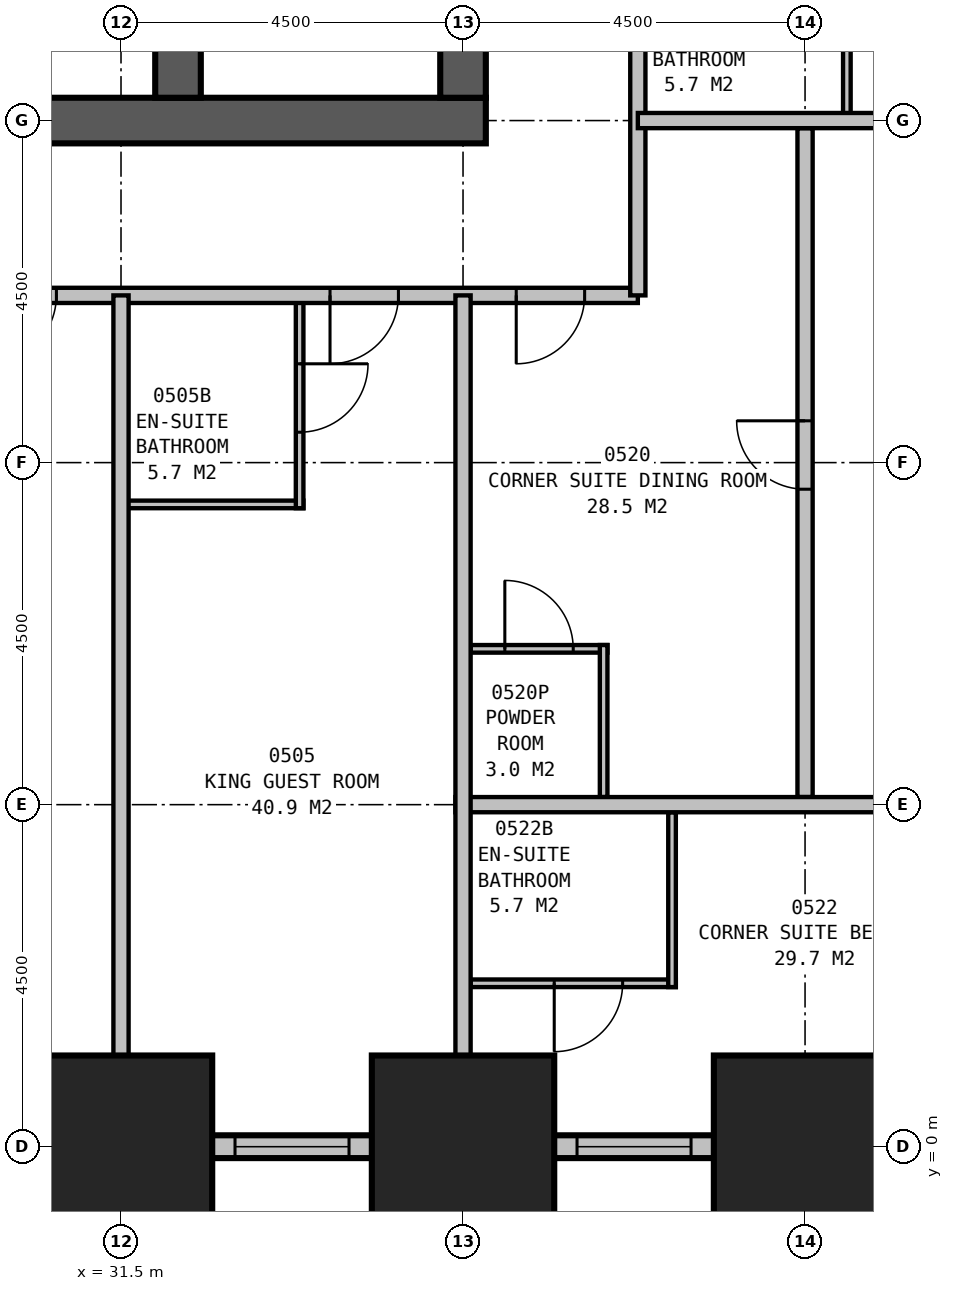
"""IFC4 building model, lengths in metres.
Left out: names, types, materials, properties, quantities, classifications, styles, units other than length and angle.
Written with IfcOpenShell. Run it as: python <this file> out.ifc"""

import sys

from ifc_helpers import new_model, si_unit, direction, frame, frame_2d, origin, origin_2d, place, context, subcontext, project, spatial, rectangle, extrude, element, fill, save


model = new_model("IFC4")
c1 = context("Model", 3, precision=1e-05, world=origin(), true_north=direction((0.0, 1.0)))
c2 = subcontext(c1, "Body", "Model", "MODEL_VIEW")
j1 = project(units=[si_unit("LENGTHUNIT", "METRE"), si_unit("PLANEANGLEUNIT", "RADIAN")], contexts=[c1])
p1 = place(None, origin())
s1 = spatial("IfcSite", under=j1, at=p1, CompositionType="ELEMENT")
p2 = place(p1, origin())
s2 = spatial("IfcBuilding", under=s1, at=p2, CompositionType="ELEMENT")
p3 = place(p2, frame((0.0, 0.0, 29.7)))
s3 = spatial("IfcBuildingStorey", under=s2, at=p3, CompositionType="ELEMENT", Elevation=29.7)
for number, where, z_axis, x_axis in (
    (1, (31.5, 0.0, 0.0), (0.0, 0.0, 1.0), (1.0, 0.0, 0.0)),
    (2, (36.0, 0.0, 0.0), (0.0, 0.0, 1.0), (1.0, 0.0, 0.0)),
    (3, (40.5, 0.0, 0.0), (0.0, 0.0, 1.0), (1.0, 0.0, 0.0)),
):
    element("IfcColumn", number, at=place(p3, frame(where, z_axis=z_axis, x_axis=x_axis)), inside=s3, PredefinedType="COLUMN", context=c2, shape_type="SweptSolid", body=[
        extrude(rectangle(XDim=2.4, YDim=2.4, at=origin_2d()), origin(), (0.0, 0.0, 1.0), 3.5),
    ])
p4 = place(p3, frame((13.2, 13.5, 0.0), z_axis=(0.0, 0.0, 1.0), x_axis=(1.0, 0.0, 0.0)))
e4 = element("IfcWall", 4, at=p4, inside=s3, PredefinedType="SHEAR", context=c2, shape_type="SweptSolid", body=[
    extrude(rectangle(XDim=23.1, YDim=0.6, at=frame_2d((11.55, 0.0))), origin(), (0.0, 0.0, 1.0), 3.5),
])
p5 = place(p3, frame((32.25, 13.8, 0.0), z_axis=(0.0, 0.0, 1.0), x_axis=(0.0, 1.0, 0.0)))
e5 = element("IfcWall", 5, at=p5, inside=s3, PredefinedType="SHEAR", context=c2, shape_type="SweptSolid", body=[
    extrude(rectangle(XDim=12.9, YDim=0.6, at=frame_2d((6.45, 0.0))), origin(), (0.0, 0.0, 1.0), 3.5),
])
p6 = place(p5, frame((5.05, 0.0, 0.0), z_axis=(0.0, 0.0, 1.0), x_axis=(-1.0, 0.0, 0.0)))
e6 = element("IfcOpeningElement", 6, at=p6, cuts=e5, PredefinedType="OPENING", context=c2, shape_type="SweptSolid", body=[
    extrude(rectangle(XDim=1.2, YDim=2.1, at=frame_2d((0.6, 1.05))), frame((0.0, 0.31, 0.0), z_axis=(0.0, -1.0, 0.0), x_axis=(1.0, 0.0, 0.0)), (0.0, 0.0, 1.0), 0.62),
])
p7 = place(p3, frame((36.0, 13.8, 0.0), z_axis=(0.0, 0.0, 1.0), x_axis=(0.0, 1.0, 0.0)))
e7 = element("IfcWall", 7, at=p7, inside=s3, PredefinedType="SHEAR", context=c2, shape_type="SweptSolid", body=[
    extrude(rectangle(XDim=2.7, YDim=0.6, at=frame_2d((1.35, 0.0))), origin(), (0.0, 0.0, 1.0), 3.5),
])
p8 = place(p3, frame((4.35, 0.0, 0.0), z_axis=(0.0, 0.0, 1.0), x_axis=(1.0, 0.0, 0.0)))
e8 = element("IfcWall", 8, at=p8, inside=s3, PredefinedType="STANDARD", context=c2, shape_type="SweptSolid", body=[
    extrude(rectangle(XDim=40.8, YDim=0.3, at=frame_2d((20.4, 0.0))), origin(), (0.0, 0.0, 1.0), 2.05),
])
p9 = place(p8, frame((1.65, 0.0, 0.5)))
e9 = element("IfcOpeningElement", 9, at=p9, cuts=e8, PredefinedType="OPENING", context=c2, shape_type="SweptSolid", body=[
    extrude(rectangle(XDim=1.5, YDim=1.4, at=frame_2d((0.75, 0.7))), frame((0.0, 0.16, 0.0), z_axis=(0.0, -1.0, 0.0), x_axis=(1.0, 0.0, 0.0)), (0.0, 0.0, 1.0), 0.32),
])
p10 = place(p8, frame((6.15, 0.0, 0.5)))
e10 = element("IfcOpeningElement", 10, at=p10, cuts=e8, PredefinedType="OPENING", context=c2, shape_type="SweptSolid", body=[
    extrude(rectangle(XDim=1.5, YDim=1.4, at=frame_2d((0.75, 0.7))), frame((0.0, 0.16, 0.0), z_axis=(0.0, -1.0, 0.0), x_axis=(1.0, 0.0, 0.0)), (0.0, 0.0, 1.0), 0.32),
])
p11 = place(p8, frame((10.65, 0.0, 0.5)))
e11 = element("IfcOpeningElement", 11, at=p11, cuts=e8, PredefinedType="OPENING", context=c2, shape_type="SweptSolid", body=[
    extrude(rectangle(XDim=1.5, YDim=1.4, at=frame_2d((0.75, 0.7))), frame((0.0, 0.16, 0.0), z_axis=(0.0, -1.0, 0.0), x_axis=(1.0, 0.0, 0.0)), (0.0, 0.0, 1.0), 0.32),
])
p12 = place(p8, frame((15.15, 0.0, 0.5)))
e12 = element("IfcOpeningElement", 12, at=p12, cuts=e8, PredefinedType="OPENING", context=c2, shape_type="SweptSolid", body=[
    extrude(rectangle(XDim=1.5, YDim=1.4, at=frame_2d((0.75, 0.7))), frame((0.0, 0.16, 0.0), z_axis=(0.0, -1.0, 0.0), x_axis=(1.0, 0.0, 0.0)), (0.0, 0.0, 1.0), 0.32),
])
p13 = place(p8, frame((19.65, 0.0, 0.5)))
e13 = element("IfcOpeningElement", 13, at=p13, cuts=e8, PredefinedType="OPENING", context=c2, shape_type="SweptSolid", body=[
    extrude(rectangle(XDim=1.5, YDim=1.4, at=frame_2d((0.75, 0.7))), frame((0.0, 0.16, 0.0), z_axis=(0.0, -1.0, 0.0), x_axis=(1.0, 0.0, 0.0)), (0.0, 0.0, 1.0), 0.32),
])
p14 = place(p8, frame((24.15, 0.0, 0.5)))
e14 = element("IfcOpeningElement", 14, at=p14, cuts=e8, PredefinedType="OPENING", context=c2, shape_type="SweptSolid", body=[
    extrude(rectangle(XDim=1.5, YDim=1.4, at=frame_2d((0.75, 0.7))), frame((0.0, 0.16, 0.0), z_axis=(0.0, -1.0, 0.0), x_axis=(1.0, 0.0, 0.0)), (0.0, 0.0, 1.0), 0.32),
])
p15 = place(p8, frame((28.65, 0.0, 0.5)))
e15 = element("IfcOpeningElement", 15, at=p15, cuts=e8, PredefinedType="OPENING", context=c2, shape_type="SweptSolid", body=[
    extrude(rectangle(XDim=1.5, YDim=1.4, at=frame_2d((0.75, 0.7))), frame((0.0, 0.16, 0.0), z_axis=(0.0, -1.0, 0.0), x_axis=(1.0, 0.0, 0.0)), (0.0, 0.0, 1.0), 0.32),
])
p16 = place(p8, frame((33.15, 0.0, 0.5)))
e16 = element("IfcOpeningElement", 16, at=p16, cuts=e8, PredefinedType="OPENING", context=c2, shape_type="SweptSolid", body=[
    extrude(rectangle(XDim=1.5, YDim=1.4, at=frame_2d((0.75, 0.7))), frame((0.0, 0.16, 0.0), z_axis=(0.0, -1.0, 0.0), x_axis=(1.0, 0.0, 0.0)), (0.0, 0.0, 1.0), 0.32),
])
p17 = place(p8, frame((37.65, 0.0, 0.5)))
e17 = element("IfcOpeningElement", 17, at=p17, cuts=e8, PredefinedType="OPENING", context=c2, shape_type="SweptSolid", body=[
    extrude(rectangle(XDim=1.5, YDim=1.4, at=frame_2d((0.75, 0.7))), frame((0.0, 0.16, 0.0), z_axis=(0.0, -1.0, 0.0), x_axis=(1.0, 0.0, 0.0)), (0.0, 0.0, 1.0), 0.32),
])
p18 = place(p3, frame((11.2, 11.2, 0.0), z_axis=(0.0, 0.0, 1.0), x_axis=(1.0, 0.0, 0.0)))
e18 = element("IfcWall", 18, at=p18, inside=s3, PredefinedType="PARTITIONING", context=c2, shape_type="SweptSolid", body=[
    extrude(rectangle(XDim=27.1, YDim=0.2, at=frame_2d((13.55, 0.0))), origin(), (0.0, 0.0, 1.0), 3.25),
])
p19 = place(p18, frame((5.95, 0.0, 0.0), z_axis=(0.0, 0.0, 1.0), x_axis=(-1.0, 0.0, 0.0)))
e19 = element("IfcOpeningElement", 19, at=p19, cuts=e18, PredefinedType="OPENING", context=c2, shape_type="SweptSolid", body=[
    extrude(rectangle(XDim=0.9, YDim=2.1, at=frame_2d((0.45, 1.05))), frame((0.0, 0.11, 0.0), z_axis=(0.0, -1.0, 0.0), x_axis=(1.0, 0.0, 0.0)), (0.0, 0.0, 1.0), 0.22),
])
p20 = place(p18, frame((10.95, 0.0, 0.0), z_axis=(0.0, 0.0, 1.0), x_axis=(-1.0, 0.0, 0.0)))
e20 = element("IfcOpeningElement", 20, at=p20, cuts=e18, PredefinedType="OPENING", context=c2, shape_type="SweptSolid", body=[
    extrude(rectangle(XDim=1.0, YDim=2.1, at=frame_2d((0.5, 1.05))), frame((0.0, 0.11, 0.0), z_axis=(0.0, -1.0, 0.0), x_axis=(1.0, 0.0, 0.0)), (0.0, 0.0, 1.0), 0.22),
])
p21 = place(p18, frame((14.95, 0.0, 0.0), z_axis=(0.0, 0.0, 1.0), x_axis=(-1.0, 0.0, 0.0)))
e21 = element("IfcOpeningElement", 21, at=p21, cuts=e18, PredefinedType="OPENING", context=c2, shape_type="SweptSolid", body=[
    extrude(rectangle(XDim=0.9, YDim=2.1, at=frame_2d((0.45, 1.05))), frame((0.0, 0.11, 0.0), z_axis=(0.0, -1.0, 0.0), x_axis=(1.0, 0.0, 0.0)), (0.0, 0.0, 1.0), 0.22),
])
p22 = place(p18, frame((19.45, 0.0, 0.0), z_axis=(0.0, 0.0, 1.0), x_axis=(-1.0, 0.0, 0.0)))
e22 = element("IfcOpeningElement", 22, at=p22, cuts=e18, PredefinedType="OPENING", context=c2, shape_type="SweptSolid", body=[
    extrude(rectangle(XDim=0.9, YDim=2.1, at=frame_2d((0.45, 1.05))), frame((0.0, 0.11, 0.0), z_axis=(0.0, -1.0, 0.0), x_axis=(1.0, 0.0, 0.0)), (0.0, 0.0, 1.0), 0.22),
])
p23 = place(p18, frame((23.95, 0.0, 0.0), z_axis=(0.0, 0.0, 1.0), x_axis=(-1.0, 0.0, 0.0)))
e23 = element("IfcOpeningElement", 23, at=p23, cuts=e18, PredefinedType="OPENING", context=c2, shape_type="SweptSolid", body=[
    extrude(rectangle(XDim=0.9, YDim=2.1, at=frame_2d((0.45, 1.05))), frame((0.0, 0.11, 0.0), z_axis=(0.0, -1.0, 0.0), x_axis=(1.0, 0.0, 0.0)), (0.0, 0.0, 1.0), 0.22),
])
p24 = place(p18, frame((1.6, 0.0, 0.0), z_axis=(0.0, 0.0, 1.0), x_axis=(-1.0, 0.0, 0.0)))
e24 = element("IfcOpeningElement", 24, at=p24, cuts=e18, PredefinedType="OPENING", context=c2, shape_type="SweptSolid", body=[
    extrude(rectangle(XDim=0.9, YDim=2.1, at=frame_2d((0.45, 1.05))), frame((0.0, 0.11, 0.0), z_axis=(0.0, -1.0, 0.0), x_axis=(1.0, 0.0, 0.0)), (0.0, 0.0, 1.0), 0.22),
])
p25 = place(p18, frame((26.4, 0.0, 0.0), z_axis=(0.0, 0.0, 1.0), x_axis=(-1.0, 0.0, 0.0)))
e25 = element("IfcOpeningElement", 25, at=p25, cuts=e18, PredefinedType="OPENING", context=c2, shape_type="SweptSolid", body=[
    extrude(rectangle(XDim=0.9, YDim=2.1, at=frame_2d((0.45, 1.05))), frame((0.0, 0.11, 0.0), z_axis=(0.0, -1.0, 0.0), x_axis=(1.0, 0.0, 0.0)), (0.0, 0.0, 1.0), 0.22),
])
p26 = place(p3, frame((38.3, 11.2, 0.0), z_axis=(0.0, 0.0, 1.0), x_axis=(0.0, 1.0, 0.0)))
e26 = element("IfcWall", 26, at=p26, inside=s3, PredefinedType="PARTITIONING", context=c2, shape_type="SweptSolid", body=[
    extrude(rectangle(XDim=18.1, YDim=0.2, at=frame_2d((9.05, 0.0))), origin(), (0.0, 0.0, 1.0), 3.25),
])
p27 = place(p26, frame((5.95, 0.0, 0.0), z_axis=(0.0, 0.0, 1.0), x_axis=(-1.0, 0.0, 0.0)))
e27 = element("IfcOpeningElement", 27, at=p27, cuts=e26, PredefinedType="OPENING", context=c2, shape_type="SweptSolid", body=[
    extrude(rectangle(XDim=0.9, YDim=2.1, at=frame_2d((0.45, 1.05))), frame((0.0, 0.11, 0.0), z_axis=(0.0, -1.0, 0.0), x_axis=(1.0, 0.0, 0.0)), (0.0, 0.0, 1.0), 0.22),
])
p28 = place(p26, frame((10.45, 0.0, 0.0), z_axis=(0.0, 0.0, 1.0), x_axis=(-1.0, 0.0, 0.0)))
e28 = element("IfcOpeningElement", 28, at=p28, cuts=e26, PredefinedType="OPENING", context=c2, shape_type="SweptSolid", body=[
    extrude(rectangle(XDim=0.9, YDim=2.1, at=frame_2d((0.45, 1.05))), frame((0.0, 0.11, 0.0), z_axis=(0.0, -1.0, 0.0), x_axis=(1.0, 0.0, 0.0)), (0.0, 0.0, 1.0), 0.22),
])
p29 = place(p26, frame((13.0, 0.0, 0.0), z_axis=(0.0, 0.0, 1.0), x_axis=(-1.0, 0.0, 0.0)))
e29 = element("IfcOpeningElement", 29, at=p29, cuts=e26, PredefinedType="OPENING", context=c2, shape_type="SweptSolid", body=[
    extrude(rectangle(XDim=1.0, YDim=2.1, at=frame_2d((0.5, 1.05))), frame((0.0, 0.11, 0.0), z_axis=(0.0, -1.0, 0.0), x_axis=(1.0, 0.0, 0.0)), (0.0, 0.0, 1.0), 0.22),
])
p30 = place(p3, frame((31.5, 11.2, 0.0), z_axis=(0.0, 0.0, 1.0), x_axis=(0.0, -1.0, 0.0)))
e30 = element("IfcWall", 30, at=p30, inside=s3, PredefinedType="PARTITIONING", context=c2, shape_type="SweptSolid", body=[
    extrude(rectangle(XDim=11.2, YDim=0.2, at=frame_2d((5.6, 0.0))), origin(), (0.0, 0.0, 1.0), 2.25),
])
p31 = place(p3, frame((31.5, 8.45, 0.0), z_axis=(0.0, 0.0, 1.0), x_axis=(1.0, 0.0, 0.0)))
e31 = element("IfcWall", 31, at=p31, inside=s3, PredefinedType="PLUMBINGWALL", context=c2, shape_type="SweptSolid", body=[
    extrude(rectangle(XDim=2.4, YDim=0.1, at=frame_2d((1.2, 0.0))), origin(), (0.0, 0.0, 1.0), 3.25),
])
p32 = place(p3, frame((33.85, 11.2, 0.0), z_axis=(0.0, 0.0, 1.0), x_axis=(0.0, -1.0, 0.0)))
e32 = element("IfcWall", 32, at=p32, inside=s3, PredefinedType="PLUMBINGWALL", context=c2, shape_type="SweptSolid", body=[
    extrude(rectangle(XDim=2.8, YDim=0.1, at=frame_2d((1.4, 0.0))), origin(), (0.0, 0.0, 1.0), 3.25),
])
p33 = place(p32, frame((0.9, 0.0, 0.0)))
e33 = element("IfcOpeningElement", 33, at=p33, cuts=e32, PredefinedType="OPENING", context=c2, shape_type="SweptSolid", body=[
    extrude(rectangle(XDim=0.9, YDim=2.1, at=frame_2d((0.45, 1.05))), frame((0.0, 0.06, 0.0), z_axis=(0.0, -1.0, 0.0), x_axis=(1.0, 0.0, 0.0)), (0.0, 0.0, 1.0), 0.12),
])
p34 = place(p3, frame((41.05, 13.5, 0.0), z_axis=(0.0, 0.0, 1.0), x_axis=(0.0, 1.0, 0.0)))
e34 = element("IfcWall", 34, at=p34, inside=s3, PredefinedType="PLUMBINGWALL", context=c2, shape_type="SweptSolid", body=[
    extrude(rectangle(XDim=2.4, YDim=0.1, at=frame_2d((1.2, 0.0))), origin(), (0.0, 0.0, 1.0), 3.25),
])
p35 = place(p3, frame((38.3, 13.5, 0.0), z_axis=(0.0, 0.0, 1.0), x_axis=(1.0, 0.0, 0.0)))
e35 = element("IfcWall", 35, at=p35, inside=s3, PredefinedType="PARTITIONING", context=c2, shape_type="SweptSolid", body=[
    extrude(rectangle(XDim=9.921, YDim=0.2, at=frame_2d((4.96, 0.0))), origin(), (0.0, 0.0, 1.0), 1.95),
])
p36 = place(p3, frame((36.0, 11.2, 0.0), z_axis=(0.0, 0.0, 1.0), x_axis=(0.0, -1.0, 0.0)))
e36 = element("IfcWall", 36, at=p36, inside=s3, PredefinedType="PARTITIONING", context=c2, shape_type="SweptSolid", body=[
    extrude(rectangle(XDim=11.2, YDim=0.2, at=frame_2d((5.6, 0.0))), origin(), (0.0, 0.0, 1.0), 2.25),
])
p37 = place(p3, frame((35.9, 4.5, 0.0), z_axis=(0.0, 0.0, 1.0), x_axis=(1.0, 0.0, 0.0)))
e37 = element("IfcWall", 37, at=p37, inside=s3, PredefinedType="PARTITIONING", context=c2, shape_type="SweptSolid", body=[
    extrude(rectangle(XDim=9.1, YDim=0.2, at=frame_2d((4.55, 0.0))), origin(), (0.0, 0.0, 1.0), 3.25),
])
p38 = place(p37, frame((6.85, 0.0, 0.0)))
e38 = element("IfcOpeningElement", 38, at=p38, cuts=e37, PredefinedType="OPENING", context=c2, shape_type="SweptSolid", body=[
    extrude(rectangle(XDim=0.9, YDim=2.1, at=frame_2d((0.45, 1.05))), frame((0.0, 0.11, 0.0), z_axis=(0.0, -1.0, 0.0), x_axis=(1.0, 0.0, 0.0)), (0.0, 0.0, 1.0), 0.22),
])
p39 = place(p3, frame((40.5, 4.6, 0.0), z_axis=(0.0, 0.0, 1.0), x_axis=(0.0, 1.0, 0.0)))
e39 = element("IfcWall", 39, at=p39, inside=s3, PredefinedType="PARTITIONING", context=c2, shape_type="SweptSolid", body=[
    extrude(rectangle(XDim=8.8, YDim=0.2, at=frame_2d((4.4, 0.0))), origin(), (0.0, 0.0, 1.0), 2.25),
])
p40 = place(p39, frame((4.05, 0.0, 0.0)))
e40 = element("IfcOpeningElement", 40, at=p40, cuts=e39, PredefinedType="OPENING", context=c2, shape_type="SweptSolid", body=[
    extrude(rectangle(XDim=0.9, YDim=2.1, at=frame_2d((0.45, 1.05))), frame((0.0, 0.11, 0.0), z_axis=(0.0, -1.0, 0.0), x_axis=(1.0, 0.0, 0.0)), (0.0, 0.0, 1.0), 0.22),
])
p41 = place(p3, frame((37.85, 4.6, 0.0), z_axis=(0.0, 0.0, 1.0), x_axis=(0.0, 1.0, 0.0)))
e41 = element("IfcWall", 41, at=p41, inside=s3, PredefinedType="PLUMBINGWALL", context=c2, shape_type="SweptSolid", body=[
    extrude(rectangle(XDim=2.0, YDim=0.1, at=frame_2d((1.0, 0.0))), origin(), (0.0, 0.0, 1.0), 3.25),
])
p42 = place(p3, frame((36.1, 6.55, 0.0), z_axis=(0.0, 0.0, 1.0), x_axis=(1.0, 0.0, 0.0)))
e42 = element("IfcWall", 42, at=p42, inside=s3, PredefinedType="PLUMBINGWALL", context=c2, shape_type="SweptSolid", body=[
    extrude(rectangle(XDim=1.8, YDim=0.1, at=frame_2d((0.9, 0.0))), origin(), (0.0, 0.0, 1.0), 3.25),
])
p43 = place(p42, frame((0.45, 0.0, 0.0)))
e43 = element("IfcOpeningElement", 43, at=p43, cuts=e42, PredefinedType="OPENING", context=c2, shape_type="SweptSolid", body=[
    extrude(rectangle(XDim=0.9, YDim=2.1, at=frame_2d((0.45, 1.05))), frame((0.0, 0.06, 0.0), z_axis=(0.0, -1.0, 0.0), x_axis=(1.0, 0.0, 0.0)), (0.0, 0.0, 1.0), 0.12),
])
p44 = place(p3, frame((38.75, 4.4, 0.0), z_axis=(0.0, 0.0, 1.0), x_axis=(0.0, -1.0, 0.0)))
e44 = element("IfcWall", 44, at=p44, inside=s3, PredefinedType="PLUMBINGWALL", context=c2, shape_type="SweptSolid", body=[
    extrude(rectangle(XDim=2.3, YDim=0.1, at=frame_2d((1.15, 0.0))), origin(), (0.0, 0.0, 1.0), 3.25),
])
p45 = place(p3, frame((36.1, 2.15, 0.0), z_axis=(0.0, 0.0, 1.0), x_axis=(1.0, 0.0, 0.0)))
e45 = element("IfcWall", 45, at=p45, inside=s3, PredefinedType="PLUMBINGWALL", context=c2, shape_type="SweptSolid", body=[
    extrude(rectangle(XDim=2.7, YDim=0.1, at=frame_2d((1.35, 0.0))), origin(), (0.0, 0.0, 1.0), 3.25),
])
p46 = place(p45, frame((2.0, 0.0, 0.0), z_axis=(0.0, 0.0, 1.0), x_axis=(-1.0, 0.0, 0.0)))
e46 = element("IfcOpeningElement", 46, at=p46, cuts=e45, PredefinedType="OPENING", context=c2, shape_type="SweptSolid", body=[
    extrude(rectangle(XDim=0.9, YDim=2.1, at=frame_2d((0.45, 1.05))), frame((0.0, 0.06, 0.0), z_axis=(0.0, -1.0, 0.0), x_axis=(1.0, 0.0, 0.0)), (0.0, 0.0, 1.0), 0.12),
])
p47 = place(p15, origin())
e47 = element("IfcWindow", 47, at=p47, inside=s3, PartitioningType="SINGLE_PANEL", PredefinedType="WINDOW", context=c2, shape_type="SweptSolid", body=[
    extrude(rectangle(XDim=1.5, YDim=1.4, at=frame_2d((0.75, 0.7))), frame((0.0, 0.03, 0.0), z_axis=(0.0, -1.0, 0.0), x_axis=(1.0, 0.0, 0.0)), (0.0, 0.0, 1.0), 0.06),
])
fill(e15, e47)
p48 = place(p16, origin())
e48 = element("IfcWindow", 48, at=p48, inside=s3, PartitioningType="SINGLE_PANEL", PredefinedType="WINDOW", context=c2, shape_type="SweptSolid", body=[
    extrude(rectangle(XDim=1.5, YDim=1.4, at=frame_2d((0.75, 0.7))), frame((0.0, 0.03, 0.0), z_axis=(0.0, -1.0, 0.0), x_axis=(1.0, 0.0, 0.0)), (0.0, 0.0, 1.0), 0.06),
])
fill(e16, e48)
p49 = place(p22, origin())
e49 = element("IfcDoor", 49, at=p49, inside=s3, OperationType="SINGLE_SWING_RIGHT", PredefinedType="DOOR", context=c2, shape_type="SweptSolid", body=[
    extrude(rectangle(XDim=0.9, YDim=2.1, at=frame_2d((0.45, 1.05))), frame((0.0, 0.025, 0.0), z_axis=(0.0, -1.0, 0.0), x_axis=(1.0, 0.0, 0.0)), (0.0, 0.0, 1.0), 0.05),
])
fill(e22, e49)
p50 = place(p23, origin())
e50 = element("IfcDoor", 50, at=p50, inside=s3, OperationType="SINGLE_SWING_RIGHT", PredefinedType="DOOR", context=c2, shape_type="SweptSolid", body=[
    extrude(rectangle(XDim=0.9, YDim=2.1, at=frame_2d((0.45, 1.05))), frame((0.0, 0.025, 0.0), z_axis=(0.0, -1.0, 0.0), x_axis=(1.0, 0.0, 0.0)), (0.0, 0.0, 1.0), 0.05),
])
fill(e23, e50)
p51 = place(p25, origin())
e51 = element("IfcDoor", 51, at=p51, inside=s3, OperationType="SINGLE_SWING_RIGHT", PredefinedType="DOOR", context=c2, shape_type="SweptSolid", body=[
    extrude(rectangle(XDim=0.9, YDim=2.1, at=frame_2d((0.45, 1.05))), frame((0.0, 0.025, 0.0), z_axis=(0.0, -1.0, 0.0), x_axis=(1.0, 0.0, 0.0)), (0.0, 0.0, 1.0), 0.05),
])
fill(e25, e51)
p52 = place(p33, origin())
e52 = element("IfcDoor", 52, at=p52, inside=s3, OperationType="SINGLE_SWING_LEFT", PredefinedType="DOOR", context=c2, shape_type="SweptSolid", body=[
    extrude(rectangle(XDim=0.9, YDim=2.1, at=frame_2d((0.45, 1.05))), frame((0.0, 0.025, 0.0), z_axis=(0.0, -1.0, 0.0), x_axis=(1.0, 0.0, 0.0)), (0.0, 0.0, 1.0), 0.05),
])
fill(e33, e52)
p53 = place(p40, origin())
e53 = element("IfcDoor", 53, at=p53, inside=s3, OperationType="SINGLE_SWING_RIGHT", PredefinedType="DOOR", context=c2, shape_type="SweptSolid", body=[
    extrude(rectangle(XDim=0.9, YDim=2.1, at=frame_2d((0.45, 1.05))), frame((0.0, 0.025, 0.0), z_axis=(0.0, -1.0, 0.0), x_axis=(1.0, 0.0, 0.0)), (0.0, 0.0, 1.0), 0.05),
])
fill(e40, e53)
p54 = place(p43, origin())
e54 = element("IfcDoor", 54, at=p54, inside=s3, OperationType="SINGLE_SWING_LEFT", PredefinedType="DOOR", context=c2, shape_type="SweptSolid", body=[
    extrude(rectangle(XDim=0.9, YDim=2.1, at=frame_2d((0.45, 1.05))), frame((0.0, 0.025, 0.0), z_axis=(0.0, -1.0, 0.0), x_axis=(1.0, 0.0, 0.0)), (0.0, 0.0, 1.0), 0.05),
])
fill(e43, e54)
p55 = place(p46, origin())
e55 = element("IfcDoor", 55, at=p55, inside=s3, OperationType="SINGLE_SWING_RIGHT", PredefinedType="DOOR", context=c2, shape_type="SweptSolid", body=[
    extrude(rectangle(XDim=0.9, YDim=2.1, at=frame_2d((0.45, 1.05))), frame((0.0, 0.025, 0.0), z_axis=(0.0, -1.0, 0.0), x_axis=(1.0, 0.0, 0.0)), (0.0, 0.0, 1.0), 0.05),
])
fill(e46, e55)
save(model, sys.argv[1])
